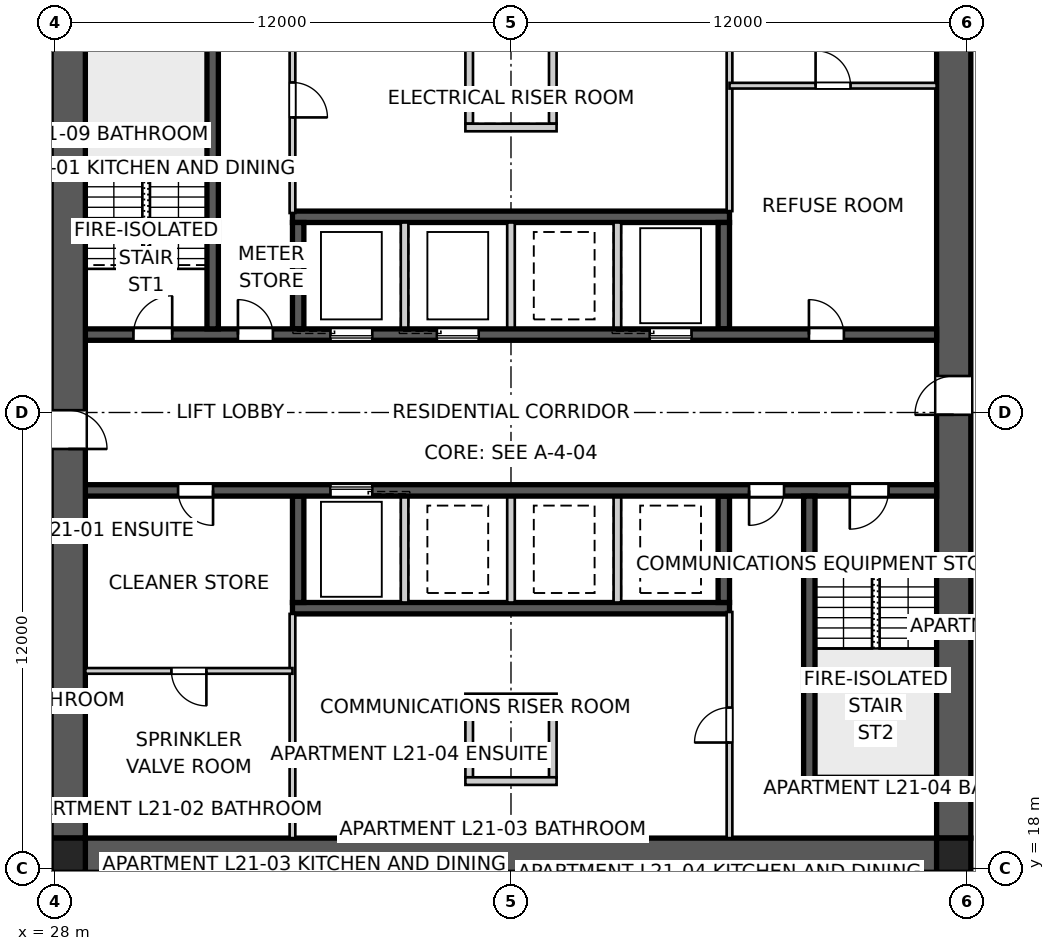
"""IFC4 building model, lengths in metres.
Left out: names, types, materials, properties, quantities, classifications, styles, units other than length and angle.
Written with IfcOpenShell. Run it as: python <this file> out.ifc"""

import sys

from ifc_helpers import new_model, si_unit, direction, frame, frame_2d, origin, origin_2d, place, context, subcontext, project, spatial, polyline, rectangle, outline, extrude, element, fill, save


model = new_model("IFC4")
c1 = context("Model", 3, precision=1e-05, world=origin(), true_north=direction((0.0, 1.0)))
c2 = subcontext(c1, "Body", "Model", "MODEL_VIEW")
j1 = project(units=[si_unit("LENGTHUNIT", "METRE"), si_unit("PLANEANGLEUNIT", "RADIAN")], contexts=[c1])
p1 = place(None, origin())
s1 = spatial("IfcSite", under=j1, at=p1, CompositionType="ELEMENT")
p2 = place(p1, origin())
s2 = spatial("IfcBuilding", under=s1, at=p2, CompositionType="ELEMENT")
p3 = place(p2, frame((0.0, 0.0, 79.4)))
s3 = spatial("IfcBuildingStorey", under=s2, at=p3, CompositionType="ELEMENT", Elevation=79.4)
p4 = place(p3, frame((51.2, 18.35, 0.0), z_axis=(0.0, 0.0, 1.0), x_axis=(-1.0, 0.0, 0.0)))
e1 = element("IfcWall", 1, at=p4, inside=s3, PredefinedType="SHEAR", context=c2, shape_type="SweptSolid", body=[
    extrude(outline(polyline([(0.0, -0.45), (22.4, -0.45), (22.4, -0.025), (22.85, -0.025), (22.85, 0.025), (22.4, 0.025), (22.4, 0.45), (0.0, 0.45), (0.0, 0.025), (-0.45, 0.025), (-0.45, -0.025), (0.0, -0.025), (0.0, -0.45)])), origin(), (0.0, 0.0, 1.0), 3.4),
])
p5 = place(p3, frame((51.65, 18.8, 0.0), z_axis=(0.0, 0.0, 1.0), x_axis=(0.0, 1.0, 0.0)))
e2 = element("IfcWall", 2, at=p5, inside=s3, PredefinedType="SHEAR", context=c2, shape_type="SweptSolid", body=[
    extrude(outline(polyline([(0.0, -0.45), (22.4, -0.45), (22.4, -0.025), (22.85, -0.025), (22.85, 0.025), (22.4, 0.025), (22.4, 0.45), (0.0, 0.45), (0.0, 0.025), (-0.45, 0.025), (-0.45, -0.025), (0.0, -0.025), (0.0, -0.45)])), origin(), (0.0, 0.0, 1.0), 3.4),
])
p6 = place(p5, frame((11.14, 0.0, 0.0)))
e3 = element("IfcOpeningElement", 3, at=p6, cuts=e2, PredefinedType="OPENING", context=c2, shape_type="SweptSolid", body=[
    extrude(rectangle(XDim=1.02, YDim=2.4, at=frame_2d((0.51, 1.2))), frame((0.0, 0.46, 0.0), z_axis=(0.0, -1.0, 0.0), x_axis=(1.0, 0.0, 0.0)), (0.0, 0.0, 1.0), 0.92),
])
p7 = place(p3, frame((28.35, 41.2, 0.0), z_axis=(0.0, 0.0, 1.0), x_axis=(0.0, -1.0, 0.0)))
e4 = element("IfcWall", 4, at=p7, inside=s3, PredefinedType="SHEAR", context=c2, shape_type="SweptSolid", body=[
    extrude(outline(polyline([(0.0, -0.45), (22.4, -0.45), (22.4, -0.025), (22.85, -0.025), (22.85, 0.025), (22.4, 0.025), (22.4, 0.45), (0.0, 0.45), (0.0, 0.025), (-0.45, 0.025), (-0.45, -0.025), (0.0, -0.025), (0.0, -0.45)])), origin(), (0.0, 0.0, 1.0), 3.4),
])
p8 = place(p7, frame((11.14, 0.0, 0.0)))
e5 = element("IfcOpeningElement", 5, at=p8, cuts=e4, PredefinedType="OPENING", context=c2, shape_type="SweptSolid", body=[
    extrude(rectangle(XDim=1.02, YDim=2.4, at=frame_2d((0.51, 1.2))), frame((0.0, 0.46, 0.0), z_axis=(0.0, -1.0, 0.0), x_axis=(1.0, 0.0, 0.0)), (0.0, 0.0, 1.0), 0.92),
])
p9 = place(p3, frame((28.8, 32.05, 0.0), z_axis=(0.0, 0.0, 1.0), x_axis=(1.0, 0.0, 0.0)))
e6 = element("IfcWall", 6, at=p9, inside=s3, PredefinedType="SHEAR", context=c2, shape_type="SweptSolid", body=[
    extrude(rectangle(XDim=22.4, YDim=0.3, at=frame_2d((11.2, 0.0))), origin(), (0.0, 0.0, 1.0), 3.4),
])
p10 = place(p9, frame((19.04, 0.0, 0.0)))
e7 = element("IfcOpeningElement", 7, at=p10, cuts=e6, PredefinedType="OPENING", context=c2, shape_type="SweptSolid", body=[
    extrude(rectangle(XDim=0.92, YDim=2.1, at=frame_2d((0.46, 1.05))), frame((0.0, 0.16, 0.0), z_axis=(0.0, -1.0, 0.0), x_axis=(1.0, 0.0, 0.0)), (0.0, 0.0, 1.0), 0.32),
])
p11 = place(p9, frame((1.265, 0.0, 0.0)))
e8 = element("IfcOpeningElement", 8, at=p11, cuts=e6, PredefinedType="OPENING", context=c2, shape_type="SweptSolid", body=[
    extrude(rectangle(XDim=1.02, YDim=2.1, at=frame_2d((0.51, 1.05))), frame((0.0, 0.16, 0.0), z_axis=(0.0, -1.0, 0.0), x_axis=(1.0, 0.0, 0.0)), (0.0, 0.0, 1.0), 0.32),
])
p12 = place(p9, frame((4.015, 0.0, 0.0)))
e9 = element("IfcOpeningElement", 9, at=p12, cuts=e6, PredefinedType="OPENING", context=c2, shape_type="SweptSolid", body=[
    extrude(rectangle(XDim=0.92, YDim=2.1, at=frame_2d((0.46, 1.05))), frame((0.0, 0.16, 0.0), z_axis=(0.0, -1.0, 0.0), x_axis=(1.0, 0.0, 0.0)), (0.0, 0.0, 1.0), 0.32),
])
p13 = place(p9, frame((6.45, 0.0, 0.0)))
e10 = element("IfcOpeningElement", 10, at=p13, cuts=e6, PredefinedType="OPENING", context=c2, shape_type="SweptSolid", body=[
    extrude(rectangle(XDim=1.1, YDim=2.1, at=frame_2d((0.55, 1.05))), frame((0.0, 0.16, 0.0), z_axis=(0.0, -1.0, 0.0), x_axis=(1.0, 0.0, 0.0)), (0.0, 0.0, 1.0), 0.32),
])
p14 = place(p9, frame((9.25, 0.0, 0.0)))
e11 = element("IfcOpeningElement", 11, at=p14, cuts=e6, PredefinedType="OPENING", context=c2, shape_type="SweptSolid", body=[
    extrude(rectangle(XDim=1.1, YDim=2.1, at=frame_2d((0.55, 1.05))), frame((0.0, 0.16, 0.0), z_axis=(0.0, -1.0, 0.0), x_axis=(1.0, 0.0, 0.0)), (0.0, 0.0, 1.0), 0.32),
])
p15 = place(p9, frame((14.85, 0.0, 0.0)))
e12 = element("IfcOpeningElement", 12, at=p15, cuts=e6, PredefinedType="OPENING", context=c2, shape_type="SweptSolid", body=[
    extrude(rectangle(XDim=1.1, YDim=2.1, at=frame_2d((0.55, 1.05))), frame((0.0, 0.16, 0.0), z_axis=(0.0, -1.0, 0.0), x_axis=(1.0, 0.0, 0.0)), (0.0, 0.0, 1.0), 0.32),
])
p16 = place(p3, frame((51.2, 27.95, 0.0), z_axis=(0.0, 0.0, 1.0), x_axis=(-1.0, 0.0, 0.0)))
e13 = element("IfcWall", 13, at=p16, inside=s3, PredefinedType="SHEAR", context=c2, shape_type="SweptSolid", body=[
    extrude(rectangle(XDim=22.4, YDim=0.3, at=frame_2d((11.2, 0.0))), origin(), (0.0, 0.0, 1.0), 3.4),
])
p17 = place(p16, frame((19.04, 0.0, 0.0)))
e14 = element("IfcOpeningElement", 14, at=p17, cuts=e13, PredefinedType="OPENING", context=c2, shape_type="SweptSolid", body=[
    extrude(rectangle(XDim=0.92, YDim=2.1, at=frame_2d((0.46, 1.05))), frame((0.0, 0.16, 0.0), z_axis=(0.0, -1.0, 0.0), x_axis=(1.0, 0.0, 0.0)), (0.0, 0.0, 1.0), 0.32),
])
p18 = place(p16, frame((1.265, 0.0, 0.0)))
e15 = element("IfcOpeningElement", 15, at=p18, cuts=e13, PredefinedType="OPENING", context=c2, shape_type="SweptSolid", body=[
    extrude(rectangle(XDim=1.02, YDim=2.1, at=frame_2d((0.51, 1.05))), frame((0.0, 0.16, 0.0), z_axis=(0.0, -1.0, 0.0), x_axis=(1.0, 0.0, 0.0)), (0.0, 0.0, 1.0), 0.32),
])
p19 = place(p16, frame((4.015, 0.0, 0.0)))
e16 = element("IfcOpeningElement", 16, at=p19, cuts=e13, PredefinedType="OPENING", context=c2, shape_type="SweptSolid", body=[
    extrude(rectangle(XDim=0.92, YDim=2.1, at=frame_2d((0.46, 1.05))), frame((0.0, 0.16, 0.0), z_axis=(0.0, -1.0, 0.0), x_axis=(1.0, 0.0, 0.0)), (0.0, 0.0, 1.0), 0.32),
])
p20 = place(p16, frame((14.85, 0.0, 0.0)))
e17 = element("IfcOpeningElement", 17, at=p20, cuts=e13, PredefinedType="OPENING", context=c2, shape_type="SweptSolid", body=[
    extrude(rectangle(XDim=1.1, YDim=2.1, at=frame_2d((0.55, 1.05))), frame((0.0, 0.16, 0.0), z_axis=(0.0, -1.0, 0.0), x_axis=(1.0, 0.0, 0.0)), (0.0, 0.0, 1.0), 0.32),
])
for number, where, z_axis, x_axis in (
    (18, (34.25, 35.15, 0.0), (0.0, 0.0, 1.0), (1.0, 0.0, 0.0)),
    (19, (45.75, 24.85, 0.0), (0.0, 0.0, 1.0), (-1.0, 0.0, 0.0)),
):
    element("IfcWall", number, at=place(p3, frame(where, z_axis=z_axis, x_axis=x_axis)), inside=s3, PredefinedType="SHEAR", context=c2, shape_type="SweptSolid", body=[
        extrude(rectangle(XDim=11.5, YDim=0.3, at=frame_2d((5.75, 0.0))), origin(), (0.0, 0.0, 1.0), 3.4),
    ])
for number, where, z_axis, x_axis in (
    (20, (34.4, 32.2, 0.0), (0.0, 0.0, 1.0), (0.0, 1.0, 0.0)),
    (21, (45.6, 27.8, 0.0), (0.0, 0.0, 1.0), (0.0, -1.0, 0.0)),
):
    element("IfcWall", number, at=place(p3, frame(where, z_axis=z_axis, x_axis=x_axis)), inside=s3, PredefinedType="SHEAR", context=c2, shape_type="SweptSolid", body=[
        extrude(rectangle(XDim=2.8, YDim=0.3, at=frame_2d((1.4, 0.0))), origin(), (0.0, 0.0, 1.0), 3.4),
    ])
for number, where, z_axis, x_axis in (
    (22, (37.2, 32.2, 0.0), (0.0, 0.0, 1.0), (0.0, 1.0, 0.0)),
    (23, (42.8, 27.8, 0.0), (0.0, 0.0, 1.0), (0.0, -1.0, 0.0)),
    (24, (40.0, 32.2, 0.0), (0.0, 0.0, 1.0), (0.0, 1.0, 0.0)),
    (25, (40.0, 27.8, 0.0), (0.0, 0.0, 1.0), (0.0, -1.0, 0.0)),
    (26, (42.8, 32.2, 0.0), (0.0, 0.0, 1.0), (0.0, 1.0, 0.0)),
    (27, (37.2, 27.8, 0.0), (0.0, 0.0, 1.0), (0.0, -1.0, 0.0)),
):
    element("IfcWall", number, at=place(p3, frame(where, z_axis=z_axis, x_axis=x_axis)), inside=s3, PredefinedType="SOLIDWALL", context=c2, shape_type="SweptSolid", body=[
        extrude(rectangle(XDim=2.8, YDim=0.2, at=frame_2d((1.4, 0.0))), origin(), (0.0, 0.0, 1.0), 3.4),
    ])
for number, where, z_axis, x_axis in (
    (28, (45.6, 32.2, 0.0), (0.0, 0.0, 1.0), (0.0, 1.0, 0.0)),
    (29, (34.4, 27.8, 0.0), (0.0, 0.0, 1.0), (0.0, -1.0, 0.0)),
):
    element("IfcWall", number, at=place(p3, frame(where, z_axis=z_axis, x_axis=x_axis)), inside=s3, PredefinedType="SHEAR", context=c2, shape_type="SweptSolid", body=[
        extrude(rectangle(XDim=2.8, YDim=0.3, at=frame_2d((1.4, 0.0))), origin(), (0.0, 0.0, 1.0), 3.4),
    ])
for number, where, z_axis, x_axis in (
    (30, (32.15, 32.2, 0.0), (0.0, 0.0, 1.0), (0.0, 1.0, 0.0)),
    (31, (47.85, 27.8, 0.0), (0.0, 0.0, 1.0), (0.0, -1.0, 0.0)),
):
    element("IfcWall", number, at=place(p3, frame(where, z_axis=z_axis, x_axis=x_axis)), inside=s3, PredefinedType="SHEAR", context=c2, shape_type="SweptSolid", body=[
        extrude(rectangle(XDim=7.7, YDim=0.3, at=frame_2d((3.85, 0.0))), origin(), (0.0, 0.0, 1.0), 3.4),
    ])
p21 = place(p3, frame((51.2, 20.25, 0.0), z_axis=(0.0, 0.0, 1.0), x_axis=(-1.0, 0.0, 0.0)))
e32 = element("IfcWall", 32, at=p21, inside=s3, PredefinedType="SHEAR", context=c2, shape_type="SweptSolid", body=[
    extrude(rectangle(XDim=3.5, YDim=0.3, at=frame_2d((1.75, 0.0))), origin(), (0.0, 0.0, 1.0), 3.4),
])
for number, where, z_axis, x_axis in (
    (33, (38.9, 37.6, 0.0), (0.0, 0.0, 1.0), (0.0, 1.0, 0.0)),
    (34, (41.1, 37.6, 0.0), (0.0, 0.0, 1.0), (0.0, 1.0, 0.0)),
):
    element("IfcWall", number, at=place(p3, frame(where, z_axis=z_axis, x_axis=x_axis)), inside=s3, PredefinedType="SOLIDWALL", context=c2, shape_type="SweptSolid", body=[
        extrude(rectangle(XDim=2.0, YDim=0.2, at=frame_2d((1.0, 0.0))), origin(), (0.0, 0.0, 1.0), 3.4),
    ])
p22 = place(p3, frame((38.8, 37.5, 0.0), z_axis=(0.0, 0.0, 1.0), x_axis=(1.0, 0.0, 0.0)))
e35 = element("IfcWall", 35, at=p22, inside=s3, PredefinedType="SOLIDWALL", context=c2, shape_type="SweptSolid", body=[
    extrude(rectangle(XDim=2.4, YDim=0.2, at=frame_2d((1.2, 0.0))), origin(), (0.0, 0.0, 1.0), 3.4),
])
for number, where, z_axis, x_axis in (
    (36, (38.9, 22.4, 0.0), (0.0, 0.0, 1.0), (0.0, -1.0, 0.0)),
    (37, (41.1, 22.4, 0.0), (0.0, 0.0, 1.0), (0.0, -1.0, 0.0)),
):
    element("IfcWall", number, at=place(p3, frame(where, z_axis=z_axis, x_axis=x_axis)), inside=s3, PredefinedType="SOLIDWALL", context=c2, shape_type="SweptSolid", body=[
        extrude(rectangle(XDim=2.0, YDim=0.2, at=frame_2d((1.0, 0.0))), origin(), (0.0, 0.0, 1.0), 3.4),
    ])
for number, where, z_axis, x_axis in (
    (38, (38.8, 22.5, 0.0), (0.0, 0.0, 1.0), (1.0, 0.0, 0.0)),
    (39, (38.8, 20.3, 0.0), (0.0, 0.0, 1.0), (1.0, 0.0, 0.0)),
):
    element("IfcWall", number, at=place(p3, frame(where, z_axis=z_axis, x_axis=x_axis)), inside=s3, PredefinedType="SOLIDWALL", context=c2, shape_type="SweptSolid", body=[
        extrude(rectangle(XDim=2.4, YDim=0.2, at=frame_2d((1.2, 0.0))), origin(), (0.0, 0.0, 1.0), 3.4),
    ])
for number, where, z_axis, x_axis in (
    (40, (28.35, 18.35, 0.0), (0.0, 0.0, 1.0), (1.0, 0.0, 0.0)),
    (41, (51.65, 18.35, 0.0), (0.0, 0.0, 1.0), (1.0, 0.0, 0.0)),
):
    element("IfcColumn", number, at=place(p3, frame(where, z_axis=z_axis, x_axis=x_axis)), inside=s3, PredefinedType="COLUMN", context=c2, shape_type="SweptSolid", body=[
        extrude(rectangle(XDim=0.9, YDim=0.9, at=origin_2d()), origin(), (0.0, 0.0, 1.0), 3.4),
    ])
p23 = place(p3, frame((34.25, 41.2, 0.0), z_axis=(0.0, 0.0, 1.0), x_axis=(0.0, -1.0, 0.0)))
e42 = element("IfcWall", 42, at=p23, inside=s3, PredefinedType="SOLIDWALL", context=c2, shape_type="SweptSolid", body=[
    extrude(rectangle(XDim=5.95, YDim=0.15, at=frame_2d((2.975, 0.0))), origin(), (0.0, 0.0, 1.0), 3.25),
])
p24 = place(p23, frame((2.515, 0.0, 0.0)))
e43 = element("IfcOpeningElement", 43, at=p24, cuts=e42, PredefinedType="OPENING", context=c2, shape_type="SweptSolid", body=[
    extrude(rectangle(XDim=0.92, YDim=2.1, at=frame_2d((0.46, 1.05))), frame((0.0, 0.085, 0.0), z_axis=(0.0, -1.0, 0.0), x_axis=(1.0, 0.0, 0.0)), (0.0, 0.0, 1.0), 0.17),
])
p25 = place(p3, frame((45.75, 41.2, 0.0), z_axis=(0.0, 0.0, 1.0), x_axis=(0.0, -1.0, 0.0)))
e44 = element("IfcWall", 44, at=p25, inside=s3, PredefinedType="SOLIDWALL", context=c2, shape_type="SweptSolid", body=[
    extrude(rectangle(XDim=5.9, YDim=0.15, at=frame_2d((2.95, 0.0))), origin(), (0.0, 0.0, 1.0), 3.25),
])
p26 = place(p3, frame((45.75, 38.6, 0.0), z_axis=(0.0, 0.0, 1.0), x_axis=(1.0, 0.0, 0.0)))
e45 = element("IfcWall", 45, at=p26, inside=s3, PredefinedType="SOLIDWALL", context=c2, shape_type="SweptSolid", body=[
    extrude(rectangle(XDim=5.45, YDim=0.15, at=frame_2d((2.725, 0.0))), origin(), (0.0, 0.0, 1.0), 3.25),
])
p27 = place(p26, frame((2.265, 0.0, 0.0)))
e46 = element("IfcOpeningElement", 46, at=p27, cuts=e45, PredefinedType="OPENING", context=c2, shape_type="SweptSolid", body=[
    extrude(rectangle(XDim=0.92, YDim=2.1, at=frame_2d((0.46, 1.05))), frame((0.0, 0.085, 0.0), z_axis=(0.0, -1.0, 0.0), x_axis=(1.0, 0.0, 0.0)), (0.0, 0.0, 1.0), 0.17),
])
p28 = place(p3, frame((45.75, 18.8, 0.0), z_axis=(0.0, 0.0, 1.0), x_axis=(0.0, 1.0, 0.0)))
e47 = element("IfcWall", 47, at=p28, inside=s3, PredefinedType="SOLIDWALL", context=c2, shape_type="SweptSolid", body=[
    extrude(rectangle(XDim=5.95, YDim=0.15, at=frame_2d((2.975, 0.0))), origin(), (0.0, 0.0, 1.0), 3.25),
])
p29 = place(p28, frame((2.515, 0.0, 0.0)))
e48 = element("IfcOpeningElement", 48, at=p29, cuts=e47, PredefinedType="OPENING", context=c2, shape_type="SweptSolid", body=[
    extrude(rectangle(XDim=0.92, YDim=2.1, at=frame_2d((0.46, 1.05))), frame((0.0, 0.085, 0.0), z_axis=(0.0, -1.0, 0.0), x_axis=(1.0, 0.0, 0.0)), (0.0, 0.0, 1.0), 0.17),
])
p30 = place(p3, frame((34.25, 18.8, 0.0), z_axis=(0.0, 0.0, 1.0), x_axis=(0.0, 1.0, 0.0)))
e49 = element("IfcWall", 49, at=p30, inside=s3, PredefinedType="SOLIDWALL", context=c2, shape_type="SweptSolid", body=[
    extrude(rectangle(XDim=5.9, YDim=0.15, at=frame_2d((2.95, 0.0))), origin(), (0.0, 0.0, 1.0), 3.25),
])
p31 = place(p3, frame((34.25, 23.2, 0.0), z_axis=(0.0, 0.0, 1.0), x_axis=(-1.0, 0.0, 0.0)))
e50 = element("IfcWall", 50, at=p31, inside=s3, PredefinedType="SOLIDWALL", context=c2, shape_type="SweptSolid", body=[
    extrude(rectangle(XDim=5.45, YDim=0.15, at=frame_2d((2.725, 0.0))), origin(), (0.0, 0.0, 1.0), 3.25),
])
p32 = place(p31, frame((2.265, 0.0, 0.0)))
e51 = element("IfcOpeningElement", 51, at=p32, cuts=e50, PredefinedType="OPENING", context=c2, shape_type="SweptSolid", body=[
    extrude(rectangle(XDim=0.92, YDim=2.1, at=frame_2d((0.46, 1.05))), frame((0.0, 0.085, 0.0), z_axis=(0.0, -1.0, 0.0), x_axis=(1.0, 0.0, 0.0)), (0.0, 0.0, 1.0), 0.17),
])
p33 = place(p10, origin())
e52 = element("IfcDoor", 52, at=p33, inside=s3, OperationType="SINGLE_SWING_LEFT", PredefinedType="DOOR", context=c2, shape_type="SweptSolid", body=[
    extrude(rectangle(XDim=0.92, YDim=2.1, at=frame_2d((0.46, 1.05))), frame((0.0, 0.025, 0.0), z_axis=(0.0, -1.0, 0.0), x_axis=(1.0, 0.0, 0.0)), (0.0, 0.0, 1.0), 0.05),
])
fill(e7, e52)
p34 = place(p17, origin())
e53 = element("IfcDoor", 53, at=p34, inside=s3, OperationType="SINGLE_SWING_LEFT", PredefinedType="DOOR", context=c2, shape_type="SweptSolid", body=[
    extrude(rectangle(XDim=0.92, YDim=2.1, at=frame_2d((0.46, 1.05))), frame((0.0, 0.025, 0.0), z_axis=(0.0, -1.0, 0.0), x_axis=(1.0, 0.0, 0.0)), (0.0, 0.0, 1.0), 0.05),
])
fill(e14, e53)
p35 = place(p18, origin())
e54 = element("IfcDoor", 54, at=p35, inside=s3, OperationType="SINGLE_SWING_RIGHT", PredefinedType="DOOR", context=c2, shape_type="SweptSolid", body=[
    extrude(rectangle(XDim=1.02, YDim=2.1, at=frame_2d((0.51, 1.05))), frame((0.0, 0.025, 0.0), z_axis=(0.0, -1.0, 0.0), x_axis=(1.0, 0.0, 0.0)), (0.0, 0.0, 1.0), 0.05),
])
fill(e15, e54)
p36 = place(p11, origin())
e55 = element("IfcDoor", 55, at=p36, inside=s3, OperationType="SINGLE_SWING_RIGHT", PredefinedType="DOOR", context=c2, shape_type="SweptSolid", body=[
    extrude(rectangle(XDim=1.02, YDim=2.1, at=frame_2d((0.51, 1.05))), frame((0.0, 0.025, 0.0), z_axis=(0.0, -1.0, 0.0), x_axis=(1.0, 0.0, 0.0)), (0.0, 0.0, 1.0), 0.05),
])
fill(e8, e55)
p37 = place(p12, origin())
e56 = element("IfcDoor", 56, at=p37, inside=s3, OperationType="SINGLE_SWING_LEFT", PredefinedType="DOOR", context=c2, shape_type="SweptSolid", body=[
    extrude(rectangle(XDim=0.92, YDim=2.1, at=frame_2d((0.46, 1.05))), frame((0.0, 0.025, 0.0), z_axis=(0.0, -1.0, 0.0), x_axis=(1.0, 0.0, 0.0)), (0.0, 0.0, 1.0), 0.05),
])
fill(e9, e56)
p38 = place(p19, origin())
e57 = element("IfcDoor", 57, at=p38, inside=s3, OperationType="SINGLE_SWING_RIGHT", PredefinedType="DOOR", context=c2, shape_type="SweptSolid", body=[
    extrude(rectangle(XDim=0.92, YDim=2.1, at=frame_2d((0.46, 1.05))), frame((0.0, 0.025, 0.0), z_axis=(0.0, -1.0, 0.0), x_axis=(1.0, 0.0, 0.0)), (0.0, 0.0, 1.0), 0.05),
])
fill(e16, e57)
p39 = place(p27, origin())
e58 = element("IfcDoor", 58, at=p39, inside=s3, OperationType="SINGLE_SWING_LEFT", PredefinedType="DOOR", context=c2, shape_type="SweptSolid", body=[
    extrude(rectangle(XDim=0.92, YDim=2.1, at=frame_2d((0.46, 1.05))), frame((0.0, 0.025, 0.0), z_axis=(0.0, -1.0, 0.0), x_axis=(1.0, 0.0, 0.0)), (0.0, 0.0, 1.0), 0.05),
])
fill(e46, e58)
p40 = place(p32, origin())
e59 = element("IfcDoor", 59, at=p40, inside=s3, OperationType="SINGLE_SWING_LEFT", PredefinedType="DOOR", context=c2, shape_type="SweptSolid", body=[
    extrude(rectangle(XDim=0.92, YDim=2.1, at=frame_2d((0.46, 1.05))), frame((0.0, 0.025, 0.0), z_axis=(0.0, -1.0, 0.0), x_axis=(1.0, 0.0, 0.0)), (0.0, 0.0, 1.0), 0.05),
])
fill(e51, e59)
p41 = place(p24, origin())
e60 = element("IfcDoor", 60, at=p41, inside=s3, OperationType="SINGLE_SWING_RIGHT", PredefinedType="DOOR", context=c2, shape_type="SweptSolid", body=[
    extrude(rectangle(XDim=0.92, YDim=2.1, at=frame_2d((0.46, 1.05))), frame((0.0, 0.025, 0.0), z_axis=(0.0, -1.0, 0.0), x_axis=(1.0, 0.0, 0.0)), (0.0, 0.0, 1.0), 0.05),
])
fill(e43, e60)
p42 = place(p29, origin())
e61 = element("IfcDoor", 61, at=p42, inside=s3, OperationType="SINGLE_SWING_LEFT", PredefinedType="DOOR", context=c2, shape_type="SweptSolid", body=[
    extrude(rectangle(XDim=0.92, YDim=2.1, at=frame_2d((0.46, 1.05))), frame((0.0, 0.025, 0.0), z_axis=(0.0, -1.0, 0.0), x_axis=(1.0, 0.0, 0.0)), (0.0, 0.0, 1.0), 0.05),
])
fill(e48, e61)
p43 = place(p6, origin())
e62 = element("IfcDoor", 62, at=p43, inside=s3, OperationType="SINGLE_SWING_LEFT", PredefinedType="DOOR", context=c2, shape_type="SweptSolid", body=[
    extrude(rectangle(XDim=1.02, YDim=2.4, at=frame_2d((0.51, 1.2))), frame((0.0, 0.025, 0.0), z_axis=(0.0, -1.0, 0.0), x_axis=(1.0, 0.0, 0.0)), (0.0, 0.0, 1.0), 0.05),
])
fill(e3, e62)
p44 = place(p8, origin())
e63 = element("IfcDoor", 63, at=p44, inside=s3, OperationType="SINGLE_SWING_RIGHT", PredefinedType="DOOR", context=c2, shape_type="SweptSolid", body=[
    extrude(rectangle(XDim=1.02, YDim=2.4, at=frame_2d((0.51, 1.2))), frame((0.0, 0.025, 0.0), z_axis=(0.0, -1.0, 0.0), x_axis=(1.0, 0.0, 0.0)), (0.0, 0.0, 1.0), 0.05),
])
fill(e5, e63)
p45 = place(p13, origin())
e64 = element("IfcDoor", 64, at=p45, inside=s3, OperationType="SLIDING_TO_LEFT", PredefinedType="DOOR", context=c2, shape_type="SweptSolid", body=[
    extrude(rectangle(XDim=1.1, YDim=2.1, at=frame_2d((0.55, 1.05))), frame((0.0, 0.025, 0.0), z_axis=(0.0, -1.0, 0.0), x_axis=(1.0, 0.0, 0.0)), (0.0, 0.0, 1.0), 0.05),
])
fill(e10, e64)
p46 = place(p14, origin())
e65 = element("IfcDoor", 65, at=p46, inside=s3, OperationType="SLIDING_TO_LEFT", PredefinedType="DOOR", context=c2, shape_type="SweptSolid", body=[
    extrude(rectangle(XDim=1.1, YDim=2.1, at=frame_2d((0.55, 1.05))), frame((0.0, 0.025, 0.0), z_axis=(0.0, -1.0, 0.0), x_axis=(1.0, 0.0, 0.0)), (0.0, 0.0, 1.0), 0.05),
])
fill(e11, e65)
p47 = place(p15, origin())
e66 = element("IfcDoor", 66, at=p47, inside=s3, OperationType="SLIDING_TO_LEFT", PredefinedType="DOOR", context=c2, shape_type="SweptSolid", body=[
    extrude(rectangle(XDim=1.1, YDim=2.1, at=frame_2d((0.55, 1.05))), frame((0.0, 0.025, 0.0), z_axis=(0.0, -1.0, 0.0), x_axis=(1.0, 0.0, 0.0)), (0.0, 0.0, 1.0), 0.05),
])
fill(e12, e66)
p48 = place(p20, origin())
e67 = element("IfcDoor", 67, at=p48, inside=s3, OperationType="SLIDING_TO_LEFT", PredefinedType="DOOR", context=c2, shape_type="SweptSolid", body=[
    extrude(rectangle(XDim=1.1, YDim=2.1, at=frame_2d((0.55, 1.05))), frame((0.0, 0.025, 0.0), z_axis=(0.0, -1.0, 0.0), x_axis=(1.0, 0.0, 0.0)), (0.0, 0.0, 1.0), 0.05),
])
fill(e17, e67)
save(model, sys.argv[1])
